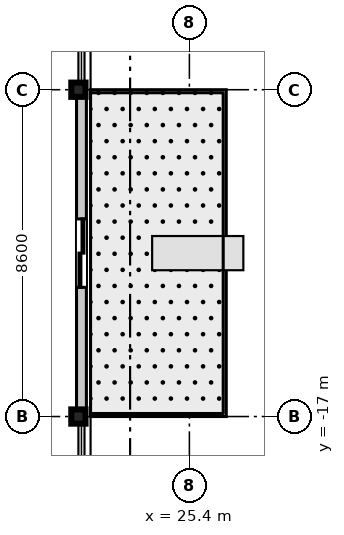
"""IFC4 building model, lengths in metres.
Left out: names, types, materials, properties, quantities, classifications, styles, units other than length and angle.
Written with IfcOpenShell. Run it as: python <this file> out.ifc"""

import sys

from ifc_helpers import new_model, si_unit, direction, frame, frame_2d, origin, origin_2d, place, context, subcontext, project, spatial, rectangle, i_section, extrude, source, transform, mapped, element, fill, save


model = new_model("IFC4")
c1 = context("Model", 3, precision=1e-05, world=origin(), true_north=direction((0.0, 1.0)))
c2 = subcontext(c1, "Body", "Model", "MODEL_VIEW")
j1 = project(units=[si_unit("LENGTHUNIT", "METRE"), si_unit("PLANEANGLEUNIT", "RADIAN")], contexts=[c1])
p1 = place(None, origin())
s1 = spatial("IfcSite", under=j1, at=p1, CompositionType="ELEMENT")
p2 = place(p1, origin())
s2 = spatial("IfcBuilding", under=s1, at=p2, CompositionType="ELEMENT")
p3 = place(p2, frame((0.0, 0.0, 281.3)))
s3 = spatial("IfcBuildingStorey", under=s2, at=p3, CompositionType="ELEMENT", Elevation=281.3)
m1 = source(origin(), c2, "Body", "SweptSolid", [
    extrude(i_section(OverallWidth=0.374, OverallDepth=0.374, WebThickness=0.014, FlangeThickness=0.023, at=origin_2d()), origin(), (0.0, 0.0, 1.0), 3.705),
])
for number, where, z_axis, x_axis in (
    (1, (22.48, -17.0, 0.0), (0.0, 0.0, 1.0), (1.0, 0.0, 0.0)),
    (2, (22.48, -8.4, 0.0), (0.0, 0.0, 1.0), (1.0, 0.0, 0.0)),
):
    element("IfcColumn", number, at=place(p3, frame(where, z_axis=z_axis, x_axis=x_axis)), inside=s3, PredefinedType="COLUMN", context=c2, shape_type="MappedRepresentation", body=[
        mapped(m1, transform((0.0, 0.0, 0.0), scale=1.0)),
    ])
m2 = source(origin(), c2, "Body", "SweptSolid", [
    extrude(rectangle(XDim=8.6, YDim=0.26, at=frame_2d((4.3, 0.0))), origin(), (0.0, 0.0, 1.0), 2.93),
])
p4 = place(p3, frame((22.56, -17.0, 0.0), z_axis=(0.0, 0.0, 1.0), x_axis=(0.0, 1.0, 0.0)))
e3 = element("IfcWall", 3, at=p4, inside=s3, PredefinedType="STANDARD", context=c2, shape_type="MappedRepresentation", body=[
    mapped(m2, transform((0.0, 0.0, 0.0), scale=1.0)),
])
p5 = place(p4, frame((3.4, 0.0, 0.0)))
e4 = element("IfcOpeningElement", 4, at=p5, cuts=e3, PredefinedType="OPENING", context=c2, shape_type="SweptSolid", body=[
    extrude(rectangle(XDim=1.8, YDim=2.25, at=frame_2d((0.9, 1.125))), frame((0.0, 0.14, 0.0), z_axis=(0.0, -1.0, 0.0), x_axis=(1.0, 0.0, 0.0)), (0.0, 0.0, 1.0), 0.28),
])
m3 = source(origin(), c2, "Body", "SweptSolid", [
    extrude(rectangle(XDim=1.8, YDim=2.25, at=frame_2d((0.9, 1.125))), frame((0.0, 0.025, 0.0), z_axis=(0.0, -1.0, 0.0), x_axis=(1.0, 0.0, 0.0)), (0.0, 0.0, 1.0), 0.05),
])
p6 = place(p5, frame((1.8, 0.0, 0.0), z_axis=(0.0, 0.0, 1.0), x_axis=(-1.0, 0.0, 0.0)))
e5 = element("IfcDoor", 5, at=p6, inside=s3, OperationType="DOUBLE_DOOR_SLIDING", PredefinedType="DOOR", context=c2, shape_type="MappedRepresentation", body=[
    mapped(m3, transform((0.0, 0.0, 0.0), scale=1.0)),
])
fill(e4, e5)
save(model, sys.argv[1])
